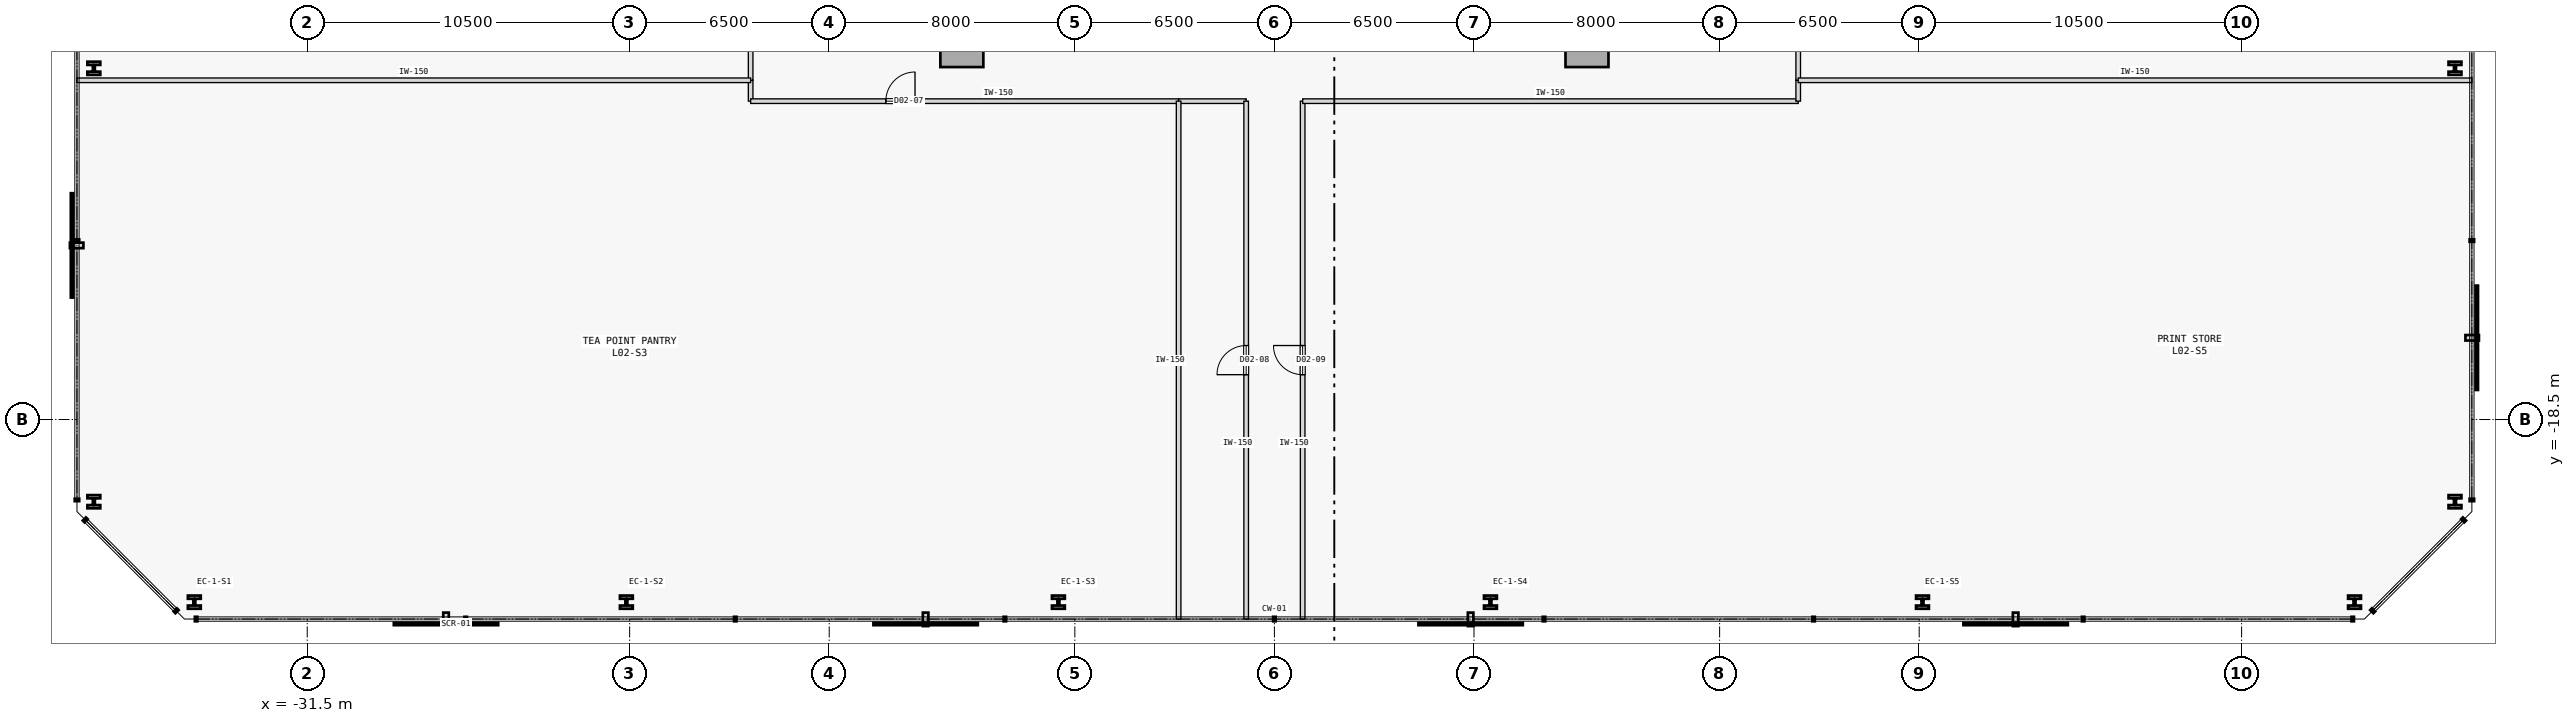
"""IFC4 building model, lengths in metres.
Left out: names, types, materials, properties, quantities, classifications, styles, units other than length and angle.
Written with IfcOpenShell. Run it as: python <this file> out.ifc"""

import sys

from ifc_helpers import new_model, si_unit, direction, frame, frame_2d, origin, origin_2d, place, context, subcontext, project, spatial, rectangle, i_section, extrude, element, fill, save


model = new_model("IFC4")
c1 = context("Model", 3, precision=1e-05, world=origin(), true_north=direction((0.0, 1.0)))
c2 = subcontext(c1, "Body", "Model", "MODEL_VIEW")
j1 = project(units=[si_unit("LENGTHUNIT", "METRE"), si_unit("PLANEANGLEUNIT", "RADIAN")], contexts=[c1])
p1 = place(None, origin())
s1 = spatial("IfcSite", under=j1, at=p1, CompositionType="ELEMENT")
p2 = place(p1, origin())
s2 = spatial("IfcBuilding", under=s1, at=p2, CompositionType="ELEMENT")
p3 = place(p2, frame((0.0, 0.0, 14.2)))
s3 = spatial("IfcBuildingStorey", under=s2, at=p3, CompositionType="ELEMENT", Elevation=14.2)
for number, where, z_axis, x_axis in (
    (1, (-10.18, -6.32, 0.0), (0.0, 0.0, 1.0), (1.0, 0.0, 0.0)),
    (2, (10.18, -6.32, 0.0), (0.0, 0.0, 1.0), (1.0, 0.0, 0.0)),
):
    element("IfcColumn", number, at=place(p3, frame(where, z_axis=z_axis, x_axis=x_axis)), inside=s3, PredefinedType="COLUMN", context=c2, shape_type="SweptSolid", body=[
        extrude(rectangle(XDim=1.4, YDim=1.4, at=origin_2d()), origin(), (0.0, 0.0, 1.0), 3.8),
    ])
for number, where, z_axis, x_axis in (
    (3, (-35.178, -24.45, 0.0), (0.0, 0.0, 1.0), (1.0, 0.0, 0.0)),
    (4, (-21.107, -24.45, 0.0), (0.0, 0.0, 1.0), (1.0, 0.0, 0.0)),
    (5, (-7.036, -24.45, 0.0), (0.0, 0.0, 1.0), (1.0, 0.0, 0.0)),
    (6, (7.036, -24.45, 0.0), (0.0, 0.0, 1.0), (1.0, 0.0, 0.0)),
    (7, (21.107, -24.45, 0.0), (0.0, 0.0, 1.0), (1.0, 0.0, 0.0)),
    (8, (35.178, -24.45, 0.0), (0.0, 0.0, 1.0), (1.0, 0.0, 0.0)),
    (9, (38.45, -21.178, 0.0), (0.0, 0.0, 1.0), (1.0, 0.0, 0.0)),
    (10, (38.45, -7.059, 0.0), (0.0, 0.0, 1.0), (1.0, 0.0, 0.0)),
    (11, (-38.45, -7.059, 0.0), (0.0, 0.0, 1.0), (1.0, 0.0, 0.0)),
    (12, (-38.45, -21.178, 0.0), (0.0, 0.0, 1.0), (1.0, 0.0, 0.0)),
):
    element("IfcColumn", number, at=place(p3, frame(where, z_axis=z_axis, x_axis=x_axis)), inside=s3, PredefinedType="COLUMN", context=c2, shape_type="SweptSolid", body=[
        extrude(i_section(OverallWidth=0.42, OverallDepth=0.431, WebThickness=0.065, FlangeThickness=0.106, FilletRadius=0.015, at=origin_2d()), origin(), (0.0, 0.0, 1.0), 3.8),
    ])
p4 = place(p3, frame((-17.059, -8.13, 0.0), z_axis=(0.0, 0.0, 1.0), x_axis=(0.0, 1.0, 0.0)))
e13 = element("IfcWall", 13, at=p4, inside=s3, PredefinedType="PARTITIONING", context=c2, shape_type="SweptSolid", body=[
    extrude(rectangle(XDim=0.68, YDim=0.15, at=frame_2d((0.34, 0.0))), origin(), (0.0, 0.0, 1.0), 3.575),
])
p5 = place(p3, frame((-17.059, -8.13, 0.0), z_axis=(0.0, 0.0, 1.0), x_axis=(1.0, 0.0, 0.0)))
e14 = element("IfcWall", 14, at=p5, inside=s3, PredefinedType="PARTITIONING", context=c2, shape_type="SweptSolid", body=[
    extrude(rectangle(XDim=13.939, YDim=0.15, at=frame_2d((6.969, 0.0))), origin(), (0.0, 0.0, 1.0), 3.575),
])
p6 = place(p5, frame((4.404, 0.0, 0.0)))
e15 = element("IfcOpeningElement", 15, at=p6, cuts=e14, PredefinedType="OPENING", context=c2, shape_type="SweptSolid", body=[
    extrude(rectangle(XDim=0.95, YDim=2.15, at=frame_2d((0.475, 1.075))), frame((0.0, 0.085, 0.0), z_axis=(0.0, -1.0, 0.0), x_axis=(1.0, 0.0, 0.0)), (0.0, 0.0, 1.0), 0.17),
])
p7 = place(p3, frame((-3.12, -8.13, 0.0), z_axis=(0.0, 0.0, 1.0), x_axis=(1.0, 0.0, 0.0)))
e16 = element("IfcWall", 16, at=p7, inside=s3, PredefinedType="PARTITIONING", context=c2, shape_type="SweptSolid", body=[
    extrude(rectangle(XDim=2.2, YDim=0.15, at=frame_2d((1.1, 0.0))), origin(), (0.0, 0.0, 1.0), 3.575),
])
p8 = place(p3, frame((-0.92, -25.0, 0.0), z_axis=(0.0, 0.0, 1.0), x_axis=(0.0, 1.0, 0.0)))
e17 = element("IfcWall", 17, at=p8, inside=s3, PredefinedType="PARTITIONING", context=c2, shape_type="SweptSolid", body=[
    extrude(rectangle(XDim=16.87, YDim=0.15, at=frame_2d((8.435, 0.0))), origin(), (0.0, 0.0, 1.0), 3.575),
])
p9 = place(p8, frame((7.96, 0.0, 0.0)))
e18 = element("IfcOpeningElement", 18, at=p9, cuts=e17, PredefinedType="OPENING", context=c2, shape_type="SweptSolid", body=[
    extrude(rectangle(XDim=0.95, YDim=2.15, at=frame_2d((0.475, 1.075))), frame((0.0, 0.085, 0.0), z_axis=(0.0, -1.0, 0.0), x_axis=(1.0, 0.0, 0.0)), (0.0, 0.0, 1.0), 0.17),
])
p10 = place(p3, frame((0.92, -25.0, 0.0), z_axis=(0.0, 0.0, 1.0), x_axis=(0.0, 1.0, 0.0)))
e19 = element("IfcWall", 19, at=p10, inside=s3, PredefinedType="PARTITIONING", context=c2, shape_type="SweptSolid", body=[
    extrude(rectangle(XDim=16.87, YDim=0.15, at=frame_2d((8.435, 0.0))), origin(), (0.0, 0.0, 1.0), 3.575),
])
p11 = place(p10, frame((7.96, 0.0, 0.0)))
e20 = element("IfcOpeningElement", 20, at=p11, cuts=e19, PredefinedType="OPENING", context=c2, shape_type="SweptSolid", body=[
    extrude(rectangle(XDim=0.95, YDim=2.15, at=frame_2d((0.475, 1.075))), frame((0.0, 0.085, 0.0), z_axis=(0.0, -1.0, 0.0), x_axis=(1.0, 0.0, 0.0)), (0.0, 0.0, 1.0), 0.17),
])
p12 = place(p3, frame((0.92, -8.13, 0.0), z_axis=(0.0, 0.0, 1.0), x_axis=(1.0, 0.0, 0.0)))
e21 = element("IfcWall", 21, at=p12, inside=s3, PredefinedType="PARTITIONING", context=c2, shape_type="SweptSolid", body=[
    extrude(rectangle(XDim=16.139, YDim=0.15, at=frame_2d((8.07, 0.0))), origin(), (0.0, 0.0, 1.0), 3.575),
])
p13 = place(p3, frame((17.059, -8.13, 0.0), z_axis=(0.0, 0.0, 1.0), x_axis=(0.0, 1.0, 0.0)))
e22 = element("IfcWall", 22, at=p13, inside=s3, PredefinedType="PARTITIONING", context=c2, shape_type="SweptSolid", body=[
    extrude(rectangle(XDim=0.68, YDim=0.15, at=frame_2d((0.34, 0.0))), origin(), (0.0, 0.0, 1.0), 3.575),
])
for number, where, z_axis, x_axis in (
    (23, (-17.059, -7.45, 0.0), (0.0, 0.0, 1.0), (0.0, 1.0, 0.0)),
    (24, (17.059, -7.45, 0.0), (0.0, 0.0, 1.0), (0.0, 1.0, 0.0)),
):
    element("IfcWall", number, at=place(p3, frame(where, z_axis=z_axis, x_axis=x_axis)), inside=s3, PredefinedType="PARTITIONING", context=c2, shape_type="SweptSolid", body=[
        extrude(rectangle(XDim=6.53, YDim=0.15, at=frame_2d((3.265, 0.0))), origin(), (0.0, 0.0, 1.0), 3.575),
    ])
p14 = place(p3, frame((-3.12, -25.0, 0.0), z_axis=(0.0, 0.0, 1.0), x_axis=(0.0, 1.0, 0.0)))
e25 = element("IfcWall", 25, at=p14, inside=s3, PredefinedType="PARTITIONING", context=c2, shape_type="SweptSolid", body=[
    extrude(rectangle(XDim=16.87, YDim=0.15, at=frame_2d((8.435, 0.0))), origin(), (0.0, 0.0, 1.0), 3.575),
])
for number, where, z_axis, x_axis in (
    (26, (-39.0, -7.45, 0.0), (0.0, 0.0, 1.0), (1.0, 0.0, 0.0)),
    (27, (17.059, -7.45, 0.0), (0.0, 0.0, 1.0), (1.0, 0.0, 0.0)),
):
    element("IfcWall", number, at=place(p3, frame(where, z_axis=z_axis, x_axis=x_axis)), inside=s3, PredefinedType="PARTITIONING", context=c2, shape_type="SweptSolid", body=[
        extrude(rectangle(XDim=21.941, YDim=0.15, at=frame_2d((10.97, 0.0))), origin(), (0.0, 0.0, 1.0), 3.575),
    ])
p15 = place(p6, origin())
e28 = element("IfcDoor", 28, at=p15, inside=s3, OperationType="SINGLE_SWING_RIGHT", PredefinedType="DOOR", context=c2, shape_type="SweptSolid", body=[
    extrude(rectangle(XDim=0.95, YDim=2.15, at=frame_2d((0.475, 1.075))), frame((0.0, 0.025, 0.0), z_axis=(0.0, -1.0, 0.0), x_axis=(1.0, 0.0, 0.0)), (0.0, 0.0, 1.0), 0.05),
])
fill(e15, e28)
p16 = place(p9, origin())
e29 = element("IfcDoor", 29, at=p16, inside=s3, OperationType="SINGLE_SWING_LEFT", PredefinedType="DOOR", context=c2, shape_type="SweptSolid", body=[
    extrude(rectangle(XDim=0.95, YDim=2.15, at=frame_2d((0.475, 1.075))), frame((0.0, 0.025, 0.0), z_axis=(0.0, -1.0, 0.0), x_axis=(1.0, 0.0, 0.0)), (0.0, 0.0, 1.0), 0.05),
])
fill(e18, e29)
p17 = place(p11, origin())
e30 = element("IfcDoor", 30, at=p17, inside=s3, OperationType="SINGLE_SWING_RIGHT", PredefinedType="DOOR", context=c2, shape_type="SweptSolid", body=[
    extrude(rectangle(XDim=0.95, YDim=2.15, at=frame_2d((0.475, 1.075))), frame((0.0, 0.025, 0.0), z_axis=(0.0, -1.0, 0.0), x_axis=(1.0, 0.0, 0.0)), (0.0, 0.0, 1.0), 0.05),
])
fill(e20, e30)
save(model, sys.argv[1])
